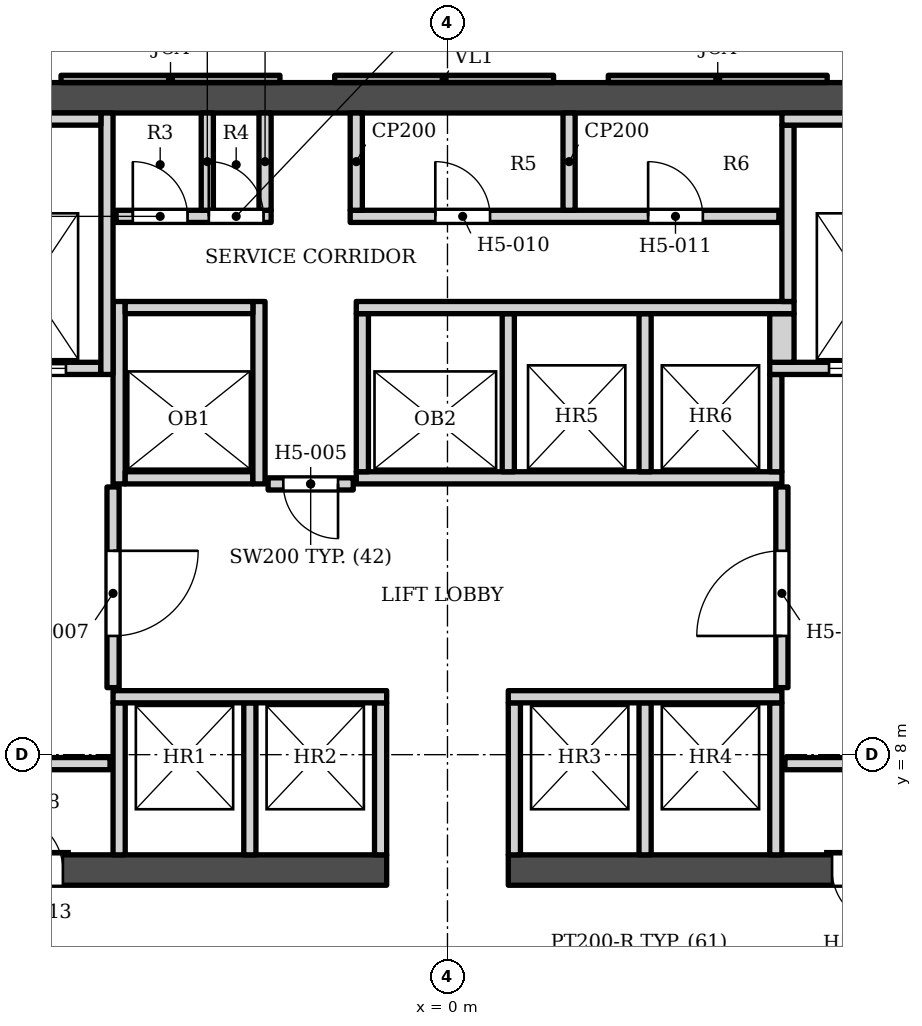
"""IFC4 building model, lengths in metres.
Left out: names, types, materials, properties, quantities, classifications, styles, units other than length and angle.
Written with IfcOpenShell. Run it as: python <this file> out.ifc"""

import sys

from ifc_helpers import new_model, si_unit, direction, frame, frame_2d, origin, place, context, subcontext, project, spatial, polyline, rectangle, outline, extrude, element, fill, save


model = new_model("IFC4")
c1 = context("Model", 3, precision=1e-05, world=origin(), true_north=direction((0.0, 1.0)))
c2 = subcontext(c1, "Body", "Model", "MODEL_VIEW")
j1 = project(units=[si_unit("LENGTHUNIT", "METRE"), si_unit("PLANEANGLEUNIT", "RADIAN")], contexts=[c1])
p1 = place(None, origin())
s1 = spatial("IfcSite", under=j1, at=p1, CompositionType="ELEMENT")
p2 = place(p1, origin())
s2 = spatial("IfcBuilding", under=s1, at=p2, CompositionType="ELEMENT")
p3 = place(p2, frame((0.0, 0.0, 91.8)))
s3 = spatial("IfcBuildingStorey", under=s2, at=p3, CompositionType="ELEMENT", Elevation=91.8)
p4 = place(p3, frame((-16.9, 18.802, 0.0), z_axis=(0.0, 0.0, 1.0), x_axis=(1.0, 0.0, 0.0)))
e1 = element("IfcWall", 1, at=p4, inside=s3, PredefinedType="SHEAR", context=c2, shape_type="SweptSolid", body=[
    extrude(rectangle(XDim=33.8, YDim=0.5, at=frame_2d((16.9, 0.0))), origin(), (0.0, 0.0, 1.0), 3.4),
])
p5 = place(p3, frame((-8.05, 6.103, 0.0), z_axis=(0.0, 0.0, 1.0), x_axis=(1.0, 0.0, 0.0)))
e2 = element("IfcWall", 2, at=p5, inside=s3, PredefinedType="SHEAR", context=c2, shape_type="SweptSolid", body=[
    extrude(rectangle(XDim=7.05, YDim=0.5, at=frame_2d((3.525, 0.0))), origin(), (0.0, 0.0, 1.0), 3.4),
])
p6 = place(p5, frame((0.825, 0.0, 0.0)))
e3 = element("IfcOpeningElement", 3, at=p6, cuts=e2, PredefinedType="OPENING", context=c2, shape_type="SweptSolid", body=[
    extrude(rectangle(XDim=0.9, YDim=2.1, at=frame_2d((0.45, 1.05))), frame((0.0, 0.26, 0.0), z_axis=(0.0, -1.0, 0.0), x_axis=(1.0, 0.0, 0.0)), (0.0, 0.0, 1.0), 0.52),
])
p7 = place(p3, frame((1.0, 6.103, 0.0), z_axis=(0.0, 0.0, 1.0), x_axis=(1.0, 0.0, 0.0)))
e4 = element("IfcWall", 4, at=p7, inside=s3, PredefinedType="SHEAR", context=c2, shape_type="SweptSolid", body=[
    extrude(rectangle(XDim=7.05, YDim=0.5, at=frame_2d((3.525, 0.0))), origin(), (0.0, 0.0, 1.0), 3.4),
])
p8 = place(p7, frame((5.325, 0.0, 0.0)))
e5 = element("IfcOpeningElement", 5, at=p8, cuts=e4, PredefinedType="OPENING", context=c2, shape_type="SweptSolid", body=[
    extrude(rectangle(XDim=0.9, YDim=2.1, at=frame_2d((0.45, 1.05))), frame((0.0, 0.26, 0.0), z_axis=(0.0, -1.0, 0.0), x_axis=(1.0, 0.0, 0.0)), (0.0, 0.0, 1.0), 0.52),
])
p9 = place(p3, origin())
e6 = element("IfcWall", 6, at=p9, inside=s3, PredefinedType="SOLIDWALL", context=c2, shape_type="SweptSolid", body=[
    extrude(outline(polyline([(2.645, 19.173), (2.645, 19.052), (6.245, 19.052), (6.245, 19.173), (2.645, 19.173)])), origin(), (0.0, 0.0, 1.0), 2.65),
])
p10 = place(p3, origin())
e7 = element("IfcWall", 7, at=p10, inside=s3, PredefinedType="ELEMENTEDWALL", context=c2, shape_type="SweptSolid", body=[
    extrude(outline(polyline([(-1.855, 19.173), (-1.855, 19.052), (1.745, 19.052), (1.745, 19.173), (-1.855, 19.173)])), origin(), (0.0, 0.0, 1.0), 2.65),
])
p11 = place(p3, origin())
e8 = element("IfcWall", 8, at=p11, inside=s3, PredefinedType="SOLIDWALL", context=c2, shape_type="SweptSolid", body=[
    extrude(outline(polyline([(-6.355, 19.173), (-6.355, 19.052), (-2.755, 19.052), (-2.755, 19.173), (-6.355, 19.173)])), origin(), (0.0, 0.0, 1.0), 2.65),
])
for number, where, z_axis, x_axis in (
    (9, (-5.4, 6.353, 0.0), (0.0, 0.0, 1.0), (0.0, 1.0, 0.0)),
    (10, (-3.25, 6.353, 0.0), (0.0, 0.0, 1.0), (0.0, 1.0, 0.0)),
    (11, (-1.1, 6.353, 0.0), (0.0, 0.0, 1.0), (0.0, 1.0, 0.0)),
    (12, (1.1, 6.353, 0.0), (0.0, 0.0, 1.0), (0.0, 1.0, 0.0)),
    (13, (3.25, 6.353, 0.0), (0.0, 0.0, 1.0), (0.0, 1.0, 0.0)),
    (14, (5.4, 6.353, 0.0), (0.0, 0.0, 1.0), (0.0, 1.0, 0.0)),
    (15, (-8.05, 7.853, 0.0), (0.0, 0.0, 1.0), (1.0, 0.0, 0.0)),
    (16, (5.55, 7.853, 0.0), (0.0, 0.0, 1.0), (1.0, 0.0, 0.0)),
):
    element("IfcWall", number, at=place(p3, frame(where, z_axis=z_axis, x_axis=x_axis)), inside=s3, PredefinedType="SOLIDWALL", context=c2, shape_type="SweptSolid", body=[
        extrude(rectangle(XDim=2.5, YDim=0.2, at=frame_2d((1.25, 0.0))), origin(), (0.0, 0.0, 1.0), 3.23),
    ])
for number, where, z_axis, x_axis in (
    (17, (-5.5, 8.953, 0.0), (0.0, 0.0, 1.0), (1.0, 0.0, 0.0)),
    (18, (1.0, 8.953, 0.0), (0.0, 0.0, 1.0), (1.0, 0.0, 0.0)),
):
    element("IfcWall", number, at=place(p3, frame(where, z_axis=z_axis, x_axis=x_axis)), inside=s3, PredefinedType="SOLIDWALL", context=c2, shape_type="SweptSolid", body=[
        extrude(rectangle(XDim=4.5, YDim=0.2, at=frame_2d((2.25, 0.0))), origin(), (0.0, 0.0, 1.0), 3.23),
    ])
p12 = place(p3, frame((-5.5, 9.103, 0.0), z_axis=(0.0, 0.0, 1.0), x_axis=(0.0, 1.0, 0.0)))
e19 = element("IfcWall", 19, at=p12, inside=s3, PredefinedType="SOLIDWALL", context=c2, shape_type="SweptSolid", body=[
    extrude(rectangle(XDim=3.3, YDim=0.2, at=frame_2d((1.65, 0.0))), origin(), (0.0, 0.0, 1.0), 3.23),
])
p13 = place(p12, frame((0.85, 0.0, 0.0)))
e20 = element("IfcOpeningElement", 20, at=p13, cuts=e19, PredefinedType="OPENING", context=c2, shape_type="SweptSolid", body=[
    extrude(rectangle(XDim=1.4, YDim=2.1, at=frame_2d((0.7, 1.05))), frame((0.0, 0.11, 0.0), z_axis=(0.0, -1.0, 0.0), x_axis=(1.0, 0.0, 0.0)), (0.0, 0.0, 1.0), 0.22),
])
p14 = place(p3, frame((5.5, 9.103, 0.0), z_axis=(0.0, 0.0, 1.0), x_axis=(0.0, 1.0, 0.0)))
e21 = element("IfcWall", 21, at=p14, inside=s3, PredefinedType="SOLIDWALL", context=c2, shape_type="SweptSolid", body=[
    extrude(rectangle(XDim=3.3, YDim=0.2, at=frame_2d((1.65, 0.0))), origin(), (0.0, 0.0, 1.0), 3.23),
])
p15 = place(p14, frame((0.85, 0.0, 0.0)))
e22 = element("IfcOpeningElement", 22, at=p15, cuts=e21, PredefinedType="OPENING", context=c2, shape_type="SweptSolid", body=[
    extrude(rectangle(XDim=1.4, YDim=2.1, at=frame_2d((0.7, 1.05))), frame((0.0, 0.11, 0.0), z_axis=(0.0, -1.0, 0.0), x_axis=(1.0, 0.0, 0.0)), (0.0, 0.0, 1.0), 0.22),
])
p16 = place(p3, frame((-2.95, 12.453, 0.0), z_axis=(0.0, 0.0, 1.0), x_axis=(1.0, 0.0, 0.0)))
e23 = element("IfcWall", 23, at=p16, inside=s3, PredefinedType="SOLIDWALL", context=c2, shape_type="SweptSolid", body=[
    extrude(rectangle(XDim=1.4, YDim=0.2, at=frame_2d((0.7, 0.0))), origin(), (0.0, 0.0, 1.0), 3.23),
])
p17 = place(p16, frame((0.25, 0.0, 0.0)))
e24 = element("IfcOpeningElement", 24, at=p17, cuts=e23, PredefinedType="OPENING", context=c2, shape_type="SweptSolid", body=[
    extrude(rectangle(XDim=0.9, YDim=2.1, at=frame_2d((0.45, 1.05))), frame((0.0, 0.11, 0.0), z_axis=(0.0, -1.0, 0.0), x_axis=(1.0, 0.0, 0.0)), (0.0, 0.0, 1.0), 0.22),
])
p18 = place(p3, frame((-5.4, 12.453, 0.0), z_axis=(0.0, 0.0, 1.0), x_axis=(0.0, 1.0, 0.0)))
e25 = element("IfcWall", 25, at=p18, inside=s3, PredefinedType="SOLIDWALL", context=c2, shape_type="SweptSolid", body=[
    extrude(rectangle(XDim=3.0, YDim=0.2, at=frame_2d((1.5, 0.0))), origin(), (0.0, 0.0, 1.0), 3.23),
])
p19 = place(p3, frame((-5.3, 12.552, 0.0), z_axis=(0.0, 0.0, 1.0), x_axis=(1.0, 0.0, 0.0)))
e26 = element("IfcWall", 26, at=p19, inside=s3, PredefinedType="SOLIDWALL", context=c2, shape_type="SweptSolid", body=[
    extrude(rectangle(XDim=2.1, YDim=0.2, at=frame_2d((1.05, 0.0))), origin(), (0.0, 0.0, 1.0), 3.23),
])
p20 = place(p3, frame((-3.1, 12.453, 0.0), z_axis=(0.0, 0.0, 1.0), x_axis=(0.0, 1.0, 0.0)))
e27 = element("IfcWall", 27, at=p20, inside=s3, PredefinedType="SOLIDWALL", context=c2, shape_type="SweptSolid", body=[
    extrude(rectangle(XDim=3.0, YDim=0.2, at=frame_2d((1.5, 0.0))), origin(), (0.0, 0.0, 1.0), 3.23),
])
p21 = place(p3, frame((-1.5, 12.552, 0.0), z_axis=(0.0, 0.0, 1.0), x_axis=(1.0, 0.0, 0.0)))
e28 = element("IfcWall", 28, at=p21, inside=s3, PredefinedType="SOLIDWALL", context=c2, shape_type="SweptSolid", body=[
    extrude(rectangle(XDim=7.0, YDim=0.2, at=frame_2d((3.5, 0.0))), origin(), (0.0, 0.0, 1.0), 3.23),
])
for number, where, z_axis, x_axis in (
    (29, (-1.4, 12.653, 0.0), (0.0, 0.0, 1.0), (0.0, 1.0, 0.0)),
    (30, (1.0, 12.653, 0.0), (0.0, 0.0, 1.0), (0.0, 1.0, 0.0)),
    (31, (3.25, 12.653, 0.0), (0.0, 0.0, 1.0), (0.0, 1.0, 0.0)),
):
    element("IfcWall", number, at=place(p3, frame(where, z_axis=z_axis, x_axis=x_axis)), inside=s3, PredefinedType="SOLIDWALL", context=c2, shape_type="SweptSolid", body=[
        extrude(rectangle(XDim=2.6, YDim=0.2, at=frame_2d((1.3, 0.0))), origin(), (0.0, 0.0, 1.0), 3.23),
    ])
p22 = place(p3, frame((5.4, 12.653, 0.0), z_axis=(0.0, 0.0, 1.0), x_axis=(0.0, 1.0, 0.0)))
e32 = element("IfcWall", 32, at=p22, inside=s3, PredefinedType="SOLIDWALL", context=c2, shape_type="SweptSolid", body=[
    extrude(rectangle(XDim=1.6, YDim=0.2, at=frame_2d((0.8, 0.0))), origin(), (0.0, 0.0, 1.0), 3.23),
])
p23 = place(p3, frame((-8.05, 14.353, 0.0), z_axis=(0.0, 0.0, 1.0), x_axis=(1.0, 0.0, 0.0)))
e33 = element("IfcWall", 33, at=p23, inside=s3, PredefinedType="SOLIDWALL", context=c2, shape_type="SweptSolid", body=[
    extrude(rectangle(XDim=2.35, YDim=0.2, at=frame_2d((1.175, 0.0))), origin(), (0.0, 0.0, 1.0), 3.23),
])
p24 = place(p23, frame((0.575, 0.0, 0.0)))
e34 = element("IfcOpeningElement", 34, at=p24, cuts=e33, PredefinedType="OPENING", context=c2, shape_type="SweptSolid", body=[
    extrude(rectangle(XDim=1.2, YDim=2.1, at=frame_2d((0.6, 1.05))), frame((0.0, 0.11, 0.0), z_axis=(0.0, -1.0, 0.0), x_axis=(1.0, 0.0, 0.0)), (0.0, 0.0, 1.0), 0.22),
])
p25 = place(p3, frame((-5.6, 14.253, 0.0), z_axis=(0.0, 0.0, 1.0), x_axis=(0.0, 1.0, 0.0)))
e35 = element("IfcWall", 35, at=p25, inside=s3, PredefinedType="SOLIDWALL", context=c2, shape_type="SweptSolid", body=[
    extrude(rectangle(XDim=4.3, YDim=0.2, at=frame_2d((2.15, 0.0))), origin(), (0.0, 0.0, 1.0), 3.23),
])
p26 = place(p3, frame((5.3, 14.353, 0.0), z_axis=(0.0, 0.0, 1.0), x_axis=(1.0, 0.0, 0.0)))
e36 = element("IfcWall", 36, at=p26, inside=s3, PredefinedType="SOLIDWALL", context=c2, shape_type="SweptSolid", body=[
    extrude(rectangle(XDim=2.75, YDim=0.2, at=frame_2d((1.375, 0.0))), origin(), (0.0, 0.0, 1.0), 3.23),
])
p27 = place(p26, frame((0.975, 0.0, 0.0)))
e37 = element("IfcOpeningElement", 37, at=p27, cuts=e36, PredefinedType="OPENING", context=c2, shape_type="SweptSolid", body=[
    extrude(rectangle(XDim=1.2, YDim=2.1, at=frame_2d((0.6, 1.05))), frame((0.0, 0.11, 0.0), z_axis=(0.0, -1.0, 0.0), x_axis=(1.0, 0.0, 0.0)), (0.0, 0.0, 1.0), 0.22),
])
p28 = place(p3, frame((5.5, 14.453, 0.0), z_axis=(0.0, 0.0, 1.0), x_axis=(0.0, 1.0, 0.0)))
e38 = element("IfcWall", 38, at=p28, inside=s3, PredefinedType="SOLIDWALL", context=c2, shape_type="SweptSolid", body=[
    extrude(rectangle(XDim=0.8, YDim=0.4, at=frame_2d((0.4, 0.0))), origin(), (0.0, 0.0, 1.0), 3.23),
])
p29 = place(p3, frame((-5.3, 15.353, 0.0), z_axis=(0.0, 0.0, 1.0), x_axis=(1.0, 0.0, 0.0)))
e39 = element("IfcWall", 39, at=p29, inside=s3, PredefinedType="SOLIDWALL", context=c2, shape_type="SweptSolid", body=[
    extrude(rectangle(XDim=2.1, YDim=0.2, at=frame_2d((1.05, 0.0))), origin(), (0.0, 0.0, 1.0), 3.23),
])
p30 = place(p3, frame((-1.5, 15.353, 0.0), z_axis=(0.0, 0.0, 1.0), x_axis=(1.0, 0.0, 0.0)))
e40 = element("IfcWall", 40, at=p30, inside=s3, PredefinedType="SOLIDWALL", context=c2, shape_type="SweptSolid", body=[
    extrude(rectangle(XDim=7.2, YDim=0.2, at=frame_2d((3.6, 0.0))), origin(), (0.0, 0.0, 1.0), 3.23),
])
p31 = place(p3, frame((5.6, 15.453, 0.0), z_axis=(0.0, 0.0, 1.0), x_axis=(0.0, 1.0, 0.0)))
e41 = element("IfcWall", 41, at=p31, inside=s3, PredefinedType="SOLIDWALL", context=c2, shape_type="SweptSolid", body=[
    extrude(rectangle(XDim=2.9, YDim=0.2, at=frame_2d((1.45, 0.0))), origin(), (0.0, 0.0, 1.0), 3.23),
])
p32 = place(p3, frame((-5.45, 16.853, 0.0), z_axis=(0.0, 0.0, 1.0), x_axis=(1.0, 0.0, 0.0)))
e42 = element("IfcWall", 42, at=p32, inside=s3, PredefinedType="SOLIDWALL", context=c2, shape_type="SweptSolid", body=[
    extrude(rectangle(XDim=2.55, YDim=0.2, at=frame_2d((1.275, 0.0))), origin(), (0.0, 0.0, 1.0), 3.23),
])
p33 = place(p32, frame((0.275, 0.0, 0.0)))
e43 = element("IfcOpeningElement", 43, at=p33, cuts=e42, PredefinedType="OPENING", context=c2, shape_type="SweptSolid", body=[
    extrude(rectangle(XDim=0.9, YDim=2.1, at=frame_2d((0.45, 1.05))), frame((0.0, 0.11, 0.0), z_axis=(0.0, -1.0, 0.0), x_axis=(1.0, 0.0, 0.0)), (0.0, 0.0, 1.0), 0.22),
])
p34 = place(p32, frame((1.525, 0.0, 0.0)))
e44 = element("IfcOpeningElement", 44, at=p34, cuts=e42, PredefinedType="OPENING", context=c2, shape_type="SweptSolid", body=[
    extrude(rectangle(XDim=0.9, YDim=2.1, at=frame_2d((0.45, 1.05))), frame((0.0, 0.11, 0.0), z_axis=(0.0, -1.0, 0.0), x_axis=(1.0, 0.0, 0.0)), (0.0, 0.0, 1.0), 0.22),
])
p35 = place(p3, frame((-1.6, 16.853, 0.0), z_axis=(0.0, 0.0, 1.0), x_axis=(1.0, 0.0, 0.0)))
e45 = element("IfcWall", 45, at=p35, inside=s3, PredefinedType="SOLIDWALL", context=c2, shape_type="SweptSolid", body=[
    extrude(rectangle(XDim=7.05, YDim=0.2, at=frame_2d((3.525, 0.0))), origin(), (0.0, 0.0, 1.0), 3.23),
])
p36 = place(p35, frame((1.4, 0.0, 0.0)))
e46 = element("IfcOpeningElement", 46, at=p36, cuts=e45, PredefinedType="OPENING", context=c2, shape_type="SweptSolid", body=[
    extrude(rectangle(XDim=0.9, YDim=2.1, at=frame_2d((0.45, 1.05))), frame((0.0, 0.11, 0.0), z_axis=(0.0, -1.0, 0.0), x_axis=(1.0, 0.0, 0.0)), (0.0, 0.0, 1.0), 0.22),
])
p37 = place(p35, frame((4.9, 0.0, 0.0)))
e47 = element("IfcOpeningElement", 47, at=p37, cuts=e45, PredefinedType="OPENING", context=c2, shape_type="SweptSolid", body=[
    extrude(rectangle(XDim=0.9, YDim=2.1, at=frame_2d((0.45, 1.05))), frame((0.0, 0.11, 0.0), z_axis=(0.0, -1.0, 0.0), x_axis=(1.0, 0.0, 0.0)), (0.0, 0.0, 1.0), 0.22),
])
for number, where, z_axis, x_axis in (
    (48, (-3.95, 16.953, 0.0), (0.0, 0.0, 1.0), (0.0, 1.0, 0.0)),
    (49, (-3.0, 16.953, 0.0), (0.0, 0.0, 1.0), (0.0, 1.0, 0.0)),
    (50, (-1.5, 16.953, 0.0), (0.0, 0.0, 1.0), (0.0, 1.0, 0.0)),
    (51, (2.0, 16.953, 0.0), (0.0, 0.0, 1.0), (0.0, 1.0, 0.0)),
):
    element("IfcWall", number, at=place(p3, frame(where, z_axis=z_axis, x_axis=x_axis)), inside=s3, PredefinedType="PARTITIONING", context=c2, shape_type="SweptSolid", body=[
        extrude(rectangle(XDim=1.6, YDim=0.2, at=frame_2d((0.8, 0.0))), origin(), (0.0, 0.0, 1.0), 3.23),
    ])
p38 = place(p3, frame((-8.05, 18.453, 0.0), z_axis=(0.0, 0.0, 1.0), x_axis=(1.0, 0.0, 0.0)))
e52 = element("IfcWall", 52, at=p38, inside=s3, PredefinedType="SOLIDWALL", context=c2, shape_type="SweptSolid", body=[
    extrude(rectangle(XDim=2.35, YDim=0.2, at=frame_2d((1.175, 0.0))), origin(), (0.0, 0.0, 1.0), 3.23),
])
p39 = place(p3, frame((5.5, 18.453, 0.0), z_axis=(0.0, 0.0, 1.0), x_axis=(1.0, 0.0, 0.0)))
e53 = element("IfcWall", 53, at=p39, inside=s3, PredefinedType="SOLIDWALL", context=c2, shape_type="SweptSolid", body=[
    extrude(rectangle(XDim=2.55, YDim=0.2, at=frame_2d((1.275, 0.0))), origin(), (0.0, 0.0, 1.0), 3.23),
])
p40 = place(p24, origin())
e54 = element("IfcDoor", 54, at=p40, inside=s3, OperationType="DOUBLE_DOOR_SLIDING", PredefinedType="DOOR", context=c2, shape_type="SweptSolid", body=[
    extrude(rectangle(XDim=1.2, YDim=2.1, at=frame_2d((0.6, 1.05))), frame((0.0, 0.025, 0.0), z_axis=(0.0, -1.0, 0.0), x_axis=(1.0, 0.0, 0.0)), (0.0, 0.0, 1.0), 0.05),
])
fill(e34, e54)
p41 = place(p27, origin())
e55 = element("IfcDoor", 55, at=p41, inside=s3, OperationType="DOUBLE_DOOR_SLIDING", PredefinedType="DOOR", context=c2, shape_type="SweptSolid", body=[
    extrude(rectangle(XDim=1.2, YDim=2.1, at=frame_2d((0.6, 1.05))), frame((0.0, 0.025, 0.0), z_axis=(0.0, -1.0, 0.0), x_axis=(1.0, 0.0, 0.0)), (0.0, 0.0, 1.0), 0.05),
])
fill(e37, e55)
p42 = place(p17, origin())
e56 = element("IfcDoor", 56, at=p42, inside=s3, OperationType="SINGLE_SWING_RIGHT", PredefinedType="DOOR", context=c2, shape_type="SweptSolid", body=[
    extrude(rectangle(XDim=0.9, YDim=2.1, at=frame_2d((0.45, 1.05))), frame((0.0, 0.025, 0.0), z_axis=(0.0, -1.0, 0.0), x_axis=(1.0, 0.0, 0.0)), (0.0, 0.0, 1.0), 0.05),
])
fill(e24, e56)
p43 = place(p13, origin())
e57 = element("IfcDoor", 57, at=p43, inside=s3, OperationType="SINGLE_SWING_RIGHT", PredefinedType="DOOR", context=c2, shape_type="SweptSolid", body=[
    extrude(rectangle(XDim=1.4, YDim=2.1, at=frame_2d((0.7, 1.05))), frame((0.0, 0.025, 0.0), z_axis=(0.0, -1.0, 0.0), x_axis=(1.0, 0.0, 0.0)), (0.0, 0.0, 1.0), 0.05),
])
fill(e20, e57)
p44 = place(p15, origin())
e58 = element("IfcDoor", 58, at=p44, inside=s3, OperationType="SINGLE_SWING_LEFT", PredefinedType="DOOR", context=c2, shape_type="SweptSolid", body=[
    extrude(rectangle(XDim=1.4, YDim=2.1, at=frame_2d((0.7, 1.05))), frame((0.0, 0.025, 0.0), z_axis=(0.0, -1.0, 0.0), x_axis=(1.0, 0.0, 0.0)), (0.0, 0.0, 1.0), 0.05),
])
fill(e22, e58)
p45 = place(p33, origin())
e59 = element("IfcDoor", 59, at=p45, inside=s3, OperationType="SINGLE_SWING_LEFT", PredefinedType="DOOR", context=c2, shape_type="SweptSolid", body=[
    extrude(rectangle(XDim=0.9, YDim=2.1, at=frame_2d((0.45, 1.05))), frame((0.0, 0.025, 0.0), z_axis=(0.0, -1.0, 0.0), x_axis=(1.0, 0.0, 0.0)), (0.0, 0.0, 1.0), 0.05),
])
fill(e43, e59)
p46 = place(p34, origin())
e60 = element("IfcDoor", 60, at=p46, inside=s3, OperationType="SINGLE_SWING_LEFT", PredefinedType="DOOR", context=c2, shape_type="SweptSolid", body=[
    extrude(rectangle(XDim=0.9, YDim=2.1, at=frame_2d((0.45, 1.05))), frame((0.0, 0.025, 0.0), z_axis=(0.0, -1.0, 0.0), x_axis=(1.0, 0.0, 0.0)), (0.0, 0.0, 1.0), 0.05),
])
fill(e44, e60)
p47 = place(p36, origin())
e61 = element("IfcDoor", 61, at=p47, inside=s3, OperationType="SINGLE_SWING_LEFT", PredefinedType="DOOR", context=c2, shape_type="SweptSolid", body=[
    extrude(rectangle(XDim=0.9, YDim=2.1, at=frame_2d((0.45, 1.05))), frame((0.0, 0.025, 0.0), z_axis=(0.0, -1.0, 0.0), x_axis=(1.0, 0.0, 0.0)), (0.0, 0.0, 1.0), 0.05),
])
fill(e46, e61)
p48 = place(p37, origin())
e62 = element("IfcDoor", 62, at=p48, inside=s3, OperationType="SINGLE_SWING_LEFT", PredefinedType="DOOR", context=c2, shape_type="SweptSolid", body=[
    extrude(rectangle(XDim=0.9, YDim=2.1, at=frame_2d((0.45, 1.05))), frame((0.0, 0.025, 0.0), z_axis=(0.0, -1.0, 0.0), x_axis=(1.0, 0.0, 0.0)), (0.0, 0.0, 1.0), 0.05),
])
fill(e47, e62)
p49 = place(p6, origin())
e63 = element("IfcDoor", 63, at=p49, inside=s3, OperationType="SINGLE_SWING_LEFT", PredefinedType="DOOR", context=c2, shape_type="SweptSolid", body=[
    extrude(rectangle(XDim=0.9, YDim=2.1, at=frame_2d((0.45, 1.05))), frame((0.0, 0.025, 0.0), z_axis=(0.0, -1.0, 0.0), x_axis=(1.0, 0.0, 0.0)), (0.0, 0.0, 1.0), 0.05),
])
fill(e3, e63)
p50 = place(p8, origin())
e64 = element("IfcDoor", 64, at=p50, inside=s3, OperationType="SINGLE_SWING_RIGHT", PredefinedType="DOOR", context=c2, shape_type="SweptSolid", body=[
    extrude(rectangle(XDim=0.9, YDim=2.1, at=frame_2d((0.45, 1.05))), frame((0.0, 0.025, 0.0), z_axis=(0.0, -1.0, 0.0), x_axis=(1.0, 0.0, 0.0)), (0.0, 0.0, 1.0), 0.05),
])
fill(e5, e64)
save(model, sys.argv[1])
